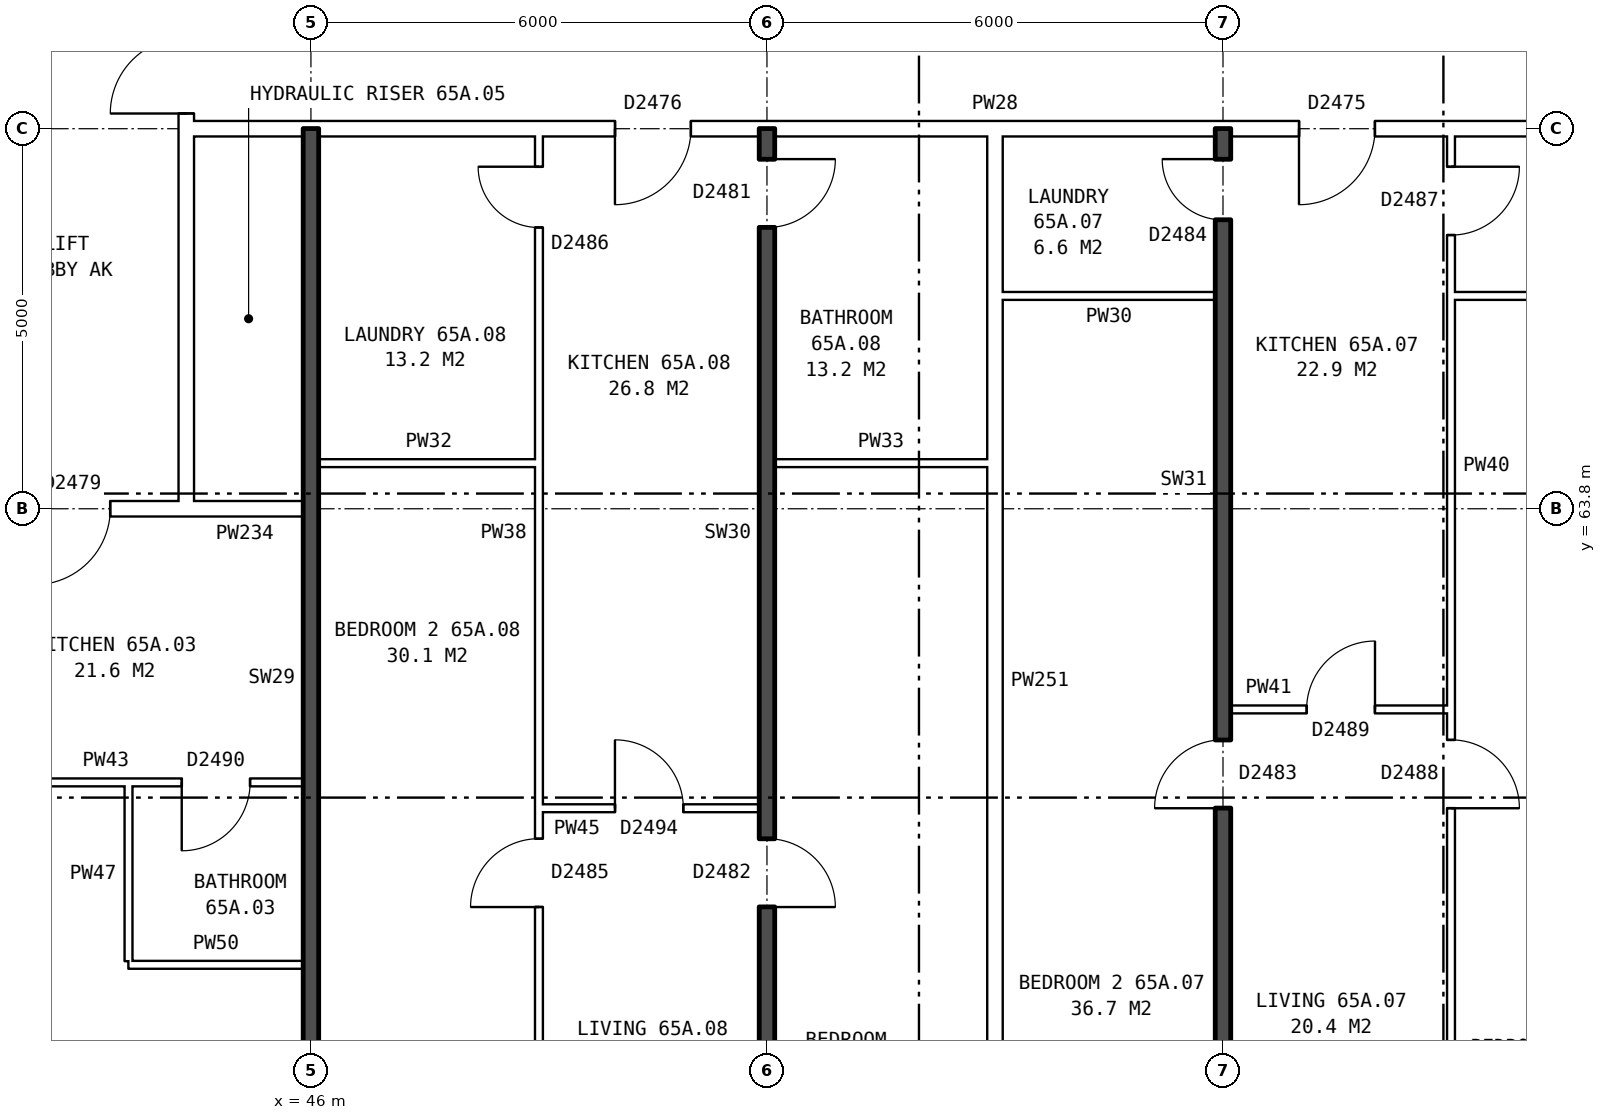
"""IFC4 building model, lengths in metres.
Left out: names, types, materials, properties, quantities, classifications, styles, units other than length and angle.
Written with IfcOpenShell. Run it as: python <this file> out.ifc"""

import sys

from ifc_helpers import new_model, si_unit, direction, frame, frame_2d, origin, place, context, subcontext, project, spatial, rectangle, extrude, element, fill, save


model = new_model("IFC4")
c1 = context("Model", 3, precision=1e-05, world=origin(), true_north=direction((0.0, 1.0)))
c2 = subcontext(c1, "Body", "Model", "MODEL_VIEW")
j1 = project(units=[si_unit("LENGTHUNIT", "METRE"), si_unit("PLANEANGLEUNIT", "RADIAN")], contexts=[c1])
p1 = place(None, origin())
s1 = spatial("IfcSite", under=j1, at=p1, CompositionType="ELEMENT")
p2 = place(p1, origin())
s2 = spatial("IfcBuilding", under=s1, at=p2, CompositionType="ELEMENT")
p3 = place(p2, frame((0.0, 0.0, 230.7)))
s3 = spatial("IfcBuildingStorey", under=s2, at=p3, CompositionType="ELEMENT", Elevation=230.7)
p4 = place(p3, frame((44.36, 63.9, 0.0), z_axis=(0.0, 0.0, 1.0), x_axis=(0.0, 1.0, 0.0)))
e1 = element("IfcWall", 1, at=p4, inside=s3, PredefinedType="PARTITIONING", context=c2, shape_type="SweptSolid", body=[
    extrude(rectangle(XDim=12.2, YDim=0.2, at=frame_2d((6.1, 0.0))), origin(), (0.0, 0.0, 1.0), 2.85),
])
p5 = place(p4, frame((5.1, 0.0, 0.0)))
e2 = element("IfcOpeningElement", 2, at=p5, cuts=e1, PredefinedType="OPENING", context=c2, shape_type="SweptSolid", body=[
    extrude(rectangle(XDim=2.0, YDim=2.1, at=frame_2d((1.0, 1.05))), frame((0.0, 0.11, 0.0), z_axis=(0.0, -1.0, 0.0), x_axis=(1.0, 0.0, 0.0)), (0.0, 0.0, 1.0), 0.22),
])
p6 = place(p3, frame((43.6, 57.8, 0.0), z_axis=(0.0, 0.0, 1.0), x_axis=(1.0, 0.0, 0.0)))
e3 = element("IfcWall", 3, at=p6, inside=s3, PredefinedType="PARTITIONING", context=c2, shape_type="SweptSolid", body=[
    extrude(rectangle(XDim=2.3, YDim=0.1, at=frame_2d((1.15, 0.0))), origin(), (0.0, 0.0, 1.0), 2.85),
])
p7 = place(p3, frame((49.0, 59.86, 0.0), z_axis=(0.0, 0.0, 1.0), x_axis=(1.0, 0.0, 0.0)))
e4 = element("IfcWall", 4, at=p7, inside=s3, PredefinedType="PARTITIONING", context=c2, shape_type="SweptSolid", body=[
    extrude(rectangle(XDim=2.9, YDim=0.1, at=frame_2d((1.45, 0.0))), origin(), (0.0, 0.0, 1.0), 2.85),
])
p8 = place(p7, frame((1.0, 0.0, 0.0)))
e5 = element("IfcOpeningElement", 5, at=p8, cuts=e4, PredefinedType="OPENING", context=c2, shape_type="SweptSolid", body=[
    extrude(rectangle(XDim=0.9, YDim=2.1, at=frame_2d((0.45, 1.05))), frame((0.0, 0.06, 0.0), z_axis=(0.0, -1.0, 0.0), x_axis=(1.0, 0.0, 0.0)), (0.0, 0.0, 1.0), 0.12),
])
p9 = place(p3, frame((40.1, 60.2, 0.0), z_axis=(0.0, 0.0, 1.0), x_axis=(1.0, 0.0, 0.0)))
e6 = element("IfcWall", 6, at=p9, inside=s3, PredefinedType="PARTITIONING", context=c2, shape_type="SweptSolid", body=[
    extrude(rectangle(XDim=5.8, YDim=0.1, at=frame_2d((2.9, 0.0))), origin(), (0.0, 0.0, 1.0), 2.85),
])
p10 = place(p9, frame((1.3, 0.0, 0.0)))
e7 = element("IfcOpeningElement", 7, at=p10, cuts=e6, PredefinedType="OPENING", context=c2, shape_type="SweptSolid", body=[
    extrude(rectangle(XDim=0.9, YDim=2.1, at=frame_2d((0.45, 1.05))), frame((0.0, 0.06, 0.0), z_axis=(0.0, -1.0, 0.0), x_axis=(1.0, 0.0, 0.0)), (0.0, 0.0, 1.0), 0.12),
])
p11 = place(p9, frame((4.2, 0.0, 0.0)))
e8 = element("IfcOpeningElement", 8, at=p11, cuts=e6, PredefinedType="OPENING", context=c2, shape_type="SweptSolid", body=[
    extrude(rectangle(XDim=0.9, YDim=2.1, at=frame_2d((0.45, 1.05))), frame((0.0, 0.06, 0.0), z_axis=(0.0, -1.0, 0.0), x_axis=(1.0, 0.0, 0.0)), (0.0, 0.0, 1.0), 0.12),
])
p12 = place(p3, frame((58.1, 61.16, 0.0), z_axis=(0.0, 0.0, 1.0), x_axis=(1.0, 0.0, 0.0)))
e9 = element("IfcWall", 9, at=p12, inside=s3, PredefinedType="PARTITIONING", context=c2, shape_type="SweptSolid", body=[
    extrude(rectangle(XDim=2.9, YDim=0.1, at=frame_2d((1.45, 0.0))), origin(), (0.0, 0.0, 1.0), 2.85),
])
p13 = place(p12, frame((1.0, 0.0, 0.0)))
e10 = element("IfcOpeningElement", 10, at=p13, cuts=e9, PredefinedType="OPENING", context=c2, shape_type="SweptSolid", body=[
    extrude(rectangle(XDim=0.9, YDim=2.1, at=frame_2d((0.45, 1.05))), frame((0.0, 0.06, 0.0), z_axis=(0.0, -1.0, 0.0), x_axis=(1.0, 0.0, 0.0)), (0.0, 0.0, 1.0), 0.12),
])
p14 = place(p3, frame((41.36, 63.8, 0.0), z_axis=(0.0, 0.0, 1.0), x_axis=(1.0, 0.0, 0.0)))
e11 = element("IfcWall", 11, at=p14, inside=s3, PredefinedType="PARTITIONING", context=c2, shape_type="SweptSolid", body=[
    extrude(rectangle(XDim=3.0, YDim=0.2, at=frame_2d((1.5, 0.0))), origin(), (0.0, 0.0, 1.0), 2.85),
])
p15 = place(p14, frame((1.0, 0.0, 0.0)))
e12 = element("IfcOpeningElement", 12, at=p15, cuts=e11, PredefinedType="OPENING", context=c2, shape_type="SweptSolid", body=[
    extrude(rectangle(XDim=1.0, YDim=2.1, at=frame_2d((0.5, 1.05))), frame((0.0, 0.11, 0.0), z_axis=(0.0, -1.0, 0.0), x_axis=(1.0, 0.0, 0.0)), (0.0, 0.0, 1.0), 0.22),
])
p16 = place(p3, frame((44.36, 63.8, 0.0), z_axis=(0.0, 0.0, 1.0), x_axis=(1.0, 0.0, 0.0)))
e13 = element("IfcWall", 13, at=p16, inside=s3, PredefinedType="PARTITIONING", context=c2, shape_type="SweptSolid", body=[
    extrude(rectangle(XDim=1.54, YDim=0.2, at=frame_2d((0.77, 0.0))), origin(), (0.0, 0.0, 1.0), 2.85),
])
p17 = place(p3, frame((46.1, 64.4, 0.0), z_axis=(0.0, 0.0, 1.0), x_axis=(1.0, 0.0, 0.0)))
e14 = element("IfcWall", 14, at=p17, inside=s3, PredefinedType="PARTITIONING", context=c2, shape_type="SweptSolid", body=[
    extrude(rectangle(XDim=2.9, YDim=0.1, at=frame_2d((1.45, 0.0))), origin(), (0.0, 0.0, 1.0), 2.85),
])
for number, where, z_axis, x_axis in (
    (15, (52.1, 64.4, 0.0), (0.0, 0.0, 1.0), (1.0, 0.0, 0.0)),
    (16, (55.1, 66.6, 0.0), (0.0, 0.0, 1.0), (1.0, 0.0, 0.0)),
):
    element("IfcWall", number, at=place(p3, frame(where, z_axis=z_axis, x_axis=x_axis)), inside=s3, PredefinedType="PARTITIONING", context=c2, shape_type="SweptSolid", body=[
        extrude(rectangle(XDim=2.8, YDim=0.1, at=frame_2d((1.4, 0.0))), origin(), (0.0, 0.0, 1.0), 2.85),
    ])
p18 = place(p3, frame((61.0, 66.6, 0.0), z_axis=(0.0, 0.0, 1.0), x_axis=(1.0, 0.0, 0.0)))
e17 = element("IfcWall", 17, at=p18, inside=s3, PredefinedType="PARTITIONING", context=c2, shape_type="SweptSolid", body=[
    extrude(rectangle(XDim=2.64, YDim=0.1, at=frame_2d((1.32, 0.0))), origin(), (0.0, 0.0, 1.0), 2.85),
])
p19 = place(p3, frame((44.36, 68.8, 0.0), z_axis=(0.0, 0.0, 1.0), x_axis=(1.0, 0.0, 0.0)))
e18 = element("IfcWall", 18, at=p19, inside=s3, PredefinedType="PARTITIONING", context=c2, shape_type="SweptSolid", body=[
    extrude(rectangle(XDim=19.28, YDim=0.2, at=frame_2d((9.64, 0.0))), origin(), (0.0, 0.0, 1.0), 2.85),
])
p20 = place(p19, frame((14.64, 0.0, 0.0)))
e19 = element("IfcOpeningElement", 19, at=p20, cuts=e18, PredefinedType="OPENING", context=c2, shape_type="SweptSolid", body=[
    extrude(rectangle(XDim=1.0, YDim=2.1, at=frame_2d((0.5, 1.05))), frame((0.0, 0.11, 0.0), z_axis=(0.0, -1.0, 0.0), x_axis=(1.0, 0.0, 0.0)), (0.0, 0.0, 1.0), 0.22),
])
p21 = place(p19, frame((5.64, 0.0, 0.0)))
e20 = element("IfcOpeningElement", 20, at=p21, cuts=e18, PredefinedType="OPENING", context=c2, shape_type="SweptSolid", body=[
    extrude(rectangle(XDim=1.0, YDim=2.1, at=frame_2d((0.5, 1.05))), frame((0.0, 0.11, 0.0), z_axis=(0.0, -1.0, 0.0), x_axis=(1.0, 0.0, 0.0)), (0.0, 0.0, 1.0), 0.22),
])
p22 = place(p3, frame((43.6, 57.85, 0.0), z_axis=(0.0, 0.0, 1.0), x_axis=(0.0, 1.0, 0.0)))
e21 = element("IfcWall", 21, at=p22, inside=s3, PredefinedType="PARTITIONING", context=c2, shape_type="SweptSolid", body=[
    extrude(rectangle(XDim=2.3, YDim=0.1, at=frame_2d((1.15, 0.0))), origin(), (0.0, 0.0, 1.0), 2.85),
])
p23 = place(p3, frame((46.0, 54.36, 0.0), z_axis=(0.0, 0.0, 1.0), x_axis=(0.0, 1.0, 0.0)))
e22 = element("IfcWall", 22, at=p23, inside=s3, PredefinedType="SOLIDWALL", context=c2, shape_type="SweptSolid", body=[
    extrude(rectangle(XDim=14.44, YDim=0.2, at=frame_2d((7.22, 0.0))), origin(), (0.0, 0.0, 1.0), 2.85),
])
p24 = place(p3, frame((49.0, 54.36, 0.0), z_axis=(0.0, 0.0, 1.0), x_axis=(0.0, 1.0, 0.0)))
e23 = element("IfcWall", 23, at=p24, inside=s3, PredefinedType="PARTITIONING", context=c2, shape_type="SweptSolid", body=[
    extrude(rectangle(XDim=14.34, YDim=0.1, at=frame_2d((7.17, 0.0))), origin(), (0.0, 0.0, 1.0), 2.85),
])
p25 = place(p24, frame((4.2, 0.0, 0.0)))
e24 = element("IfcOpeningElement", 24, at=p25, cuts=e23, PredefinedType="OPENING", context=c2, shape_type="SweptSolid", body=[
    extrude(rectangle(XDim=0.9, YDim=2.1, at=frame_2d((0.45, 1.05))), frame((0.0, 0.06, 0.0), z_axis=(0.0, -1.0, 0.0), x_axis=(1.0, 0.0, 0.0)), (0.0, 0.0, 1.0), 0.12),
])
p26 = place(p24, frame((13.14, 0.0, 0.0)))
e25 = element("IfcOpeningElement", 25, at=p26, cuts=e23, PredefinedType="OPENING", context=c2, shape_type="SweptSolid", body=[
    extrude(rectangle(XDim=0.8, YDim=2.1, at=frame_2d((0.4, 1.05))), frame((0.0, 0.06, 0.0), z_axis=(0.0, -1.0, 0.0), x_axis=(1.0, 0.0, 0.0)), (0.0, 0.0, 1.0), 0.12),
])
p27 = place(p3, frame((52.0, 54.36, 0.0), z_axis=(0.0, 0.0, 1.0), x_axis=(0.0, 1.0, 0.0)))
e26 = element("IfcWall", 26, at=p27, inside=s3, PredefinedType="SOLIDWALL", context=c2, shape_type="SweptSolid", body=[
    extrude(rectangle(XDim=14.44, YDim=0.2, at=frame_2d((7.22, 0.0))), origin(), (0.0, 0.0, 1.0), 2.85),
])
p28 = place(p27, frame((4.2, 0.0, 0.0)))
e27 = element("IfcOpeningElement", 27, at=p28, cuts=e26, PredefinedType="OPENING", context=c2, shape_type="SweptSolid", body=[
    extrude(rectangle(XDim=0.9, YDim=2.1, at=frame_2d((0.45, 1.05))), frame((0.0, 0.11, 0.0), z_axis=(0.0, -1.0, 0.0), x_axis=(1.0, 0.0, 0.0)), (0.0, 0.0, 1.0), 0.22),
])
p29 = place(p27, frame((13.14, 0.0, 0.0)))
e28 = element("IfcOpeningElement", 28, at=p29, cuts=e26, PredefinedType="OPENING", context=c2, shape_type="SweptSolid", body=[
    extrude(rectangle(XDim=0.9, YDim=2.1, at=frame_2d((0.45, 1.05))), frame((0.0, 0.11, 0.0), z_axis=(0.0, -1.0, 0.0), x_axis=(1.0, 0.0, 0.0)), (0.0, 0.0, 1.0), 0.22),
])
p30 = place(p3, frame((55.0, 54.36, 0.0), z_axis=(0.0, 0.0, 1.0), x_axis=(0.0, 1.0, 0.0)))
e29 = element("IfcWall", 29, at=p30, inside=s3, PredefinedType="PARTITIONING", context=c2, shape_type="SweptSolid", body=[
    extrude(rectangle(XDim=14.34, YDim=0.2, at=frame_2d((7.17, 0.0))), origin(), (0.0, 0.0, 1.0), 2.85),
])
p31 = place(p3, frame((58.0, 54.36, 0.0), z_axis=(0.0, 0.0, 1.0), x_axis=(0.0, 1.0, 0.0)))
e30 = element("IfcWall", 30, at=p31, inside=s3, PredefinedType="SOLIDWALL", context=c2, shape_type="SweptSolid", body=[
    extrude(rectangle(XDim=14.44, YDim=0.2, at=frame_2d((7.22, 0.0))), origin(), (0.0, 0.0, 1.0), 2.85),
])
p32 = place(p31, frame((5.5, 0.0, 0.0)))
e31 = element("IfcOpeningElement", 31, at=p32, cuts=e30, PredefinedType="OPENING", context=c2, shape_type="SweptSolid", body=[
    extrude(rectangle(XDim=0.9, YDim=2.1, at=frame_2d((0.45, 1.05))), frame((0.0, 0.11, 0.0), z_axis=(0.0, -1.0, 0.0), x_axis=(1.0, 0.0, 0.0)), (0.0, 0.0, 1.0), 0.22),
])
p33 = place(p31, frame((13.24, 0.0, 0.0)))
e32 = element("IfcOpeningElement", 32, at=p33, cuts=e30, PredefinedType="OPENING", context=c2, shape_type="SweptSolid", body=[
    extrude(rectangle(XDim=0.8, YDim=2.1, at=frame_2d((0.4, 1.05))), frame((0.0, 0.11, 0.0), z_axis=(0.0, -1.0, 0.0), x_axis=(1.0, 0.0, 0.0)), (0.0, 0.0, 1.0), 0.22),
])
p34 = place(p3, frame((61.0, 54.36, 0.0), z_axis=(0.0, 0.0, 1.0), x_axis=(0.0, 1.0, 0.0)))
e33 = element("IfcWall", 33, at=p34, inside=s3, PredefinedType="PARTITIONING", context=c2, shape_type="SweptSolid", body=[
    extrude(rectangle(XDim=14.34, YDim=0.1, at=frame_2d((7.17, 0.0))), origin(), (0.0, 0.0, 1.0), 2.85),
])
p35 = place(p34, frame((5.5, 0.0, 0.0)))
e34 = element("IfcOpeningElement", 34, at=p35, cuts=e33, PredefinedType="OPENING", context=c2, shape_type="SweptSolid", body=[
    extrude(rectangle(XDim=0.9, YDim=2.1, at=frame_2d((0.45, 1.05))), frame((0.0, 0.06, 0.0), z_axis=(0.0, -1.0, 0.0), x_axis=(1.0, 0.0, 0.0)), (0.0, 0.0, 1.0), 0.12),
])
p36 = place(p34, frame((13.04, 0.0, 0.0)))
e35 = element("IfcOpeningElement", 35, at=p36, cuts=e33, PredefinedType="OPENING", context=c2, shape_type="SweptSolid", body=[
    extrude(rectangle(XDim=0.9, YDim=2.1, at=frame_2d((0.45, 1.05))), frame((0.0, 0.06, 0.0), z_axis=(0.0, -1.0, 0.0), x_axis=(1.0, 0.0, 0.0)), (0.0, 0.0, 1.0), 0.12),
])
p37 = place(p5, origin())
e36 = element("IfcDoor", 36, at=p37, inside=s3, OperationType="DOUBLE_DOOR_SINGLE_SWING", PredefinedType="DOOR", context=c2, shape_type="SweptSolid", body=[
    extrude(rectangle(XDim=2.0, YDim=2.1, at=frame_2d((1.0, 1.05))), frame((0.0, 0.025, 0.0), z_axis=(0.0, -1.0, 0.0), x_axis=(1.0, 0.0, 0.0)), (0.0, 0.0, 1.0), 0.05),
])
fill(e2, e36)
p38 = place(p15, frame((1.0, 0.0, 0.0), z_axis=(0.0, 0.0, 1.0), x_axis=(-1.0, 0.0, 0.0)))
e37 = element("IfcDoor", 37, at=p38, inside=s3, OperationType="SINGLE_SWING_RIGHT", PredefinedType="DOOR", context=c2, shape_type="SweptSolid", body=[
    extrude(rectangle(XDim=1.0, YDim=2.1, at=frame_2d((0.5, 1.05))), frame((0.0, 0.025, 0.0), z_axis=(0.0, -1.0, 0.0), x_axis=(1.0, 0.0, 0.0)), (0.0, 0.0, 1.0), 0.05),
])
fill(e12, e37)
p39 = place(p11, frame((0.9, 0.0, 0.0), z_axis=(0.0, 0.0, 1.0), x_axis=(-1.0, 0.0, 0.0)))
e38 = element("IfcDoor", 38, at=p39, inside=s3, OperationType="SINGLE_SWING_RIGHT", PredefinedType="DOOR", context=c2, shape_type="SweptSolid", body=[
    extrude(rectangle(XDim=0.9, YDim=2.1, at=frame_2d((0.45, 1.05))), frame((0.0, 0.025, 0.0), z_axis=(0.0, -1.0, 0.0), x_axis=(1.0, 0.0, 0.0)), (0.0, 0.0, 1.0), 0.05),
])
fill(e8, e38)
p40 = place(p35, frame((0.9, 0.0, 0.0), z_axis=(0.0, 0.0, 1.0), x_axis=(-1.0, 0.0, 0.0)))
e39 = element("IfcDoor", 39, at=p40, inside=s3, OperationType="SINGLE_SWING_RIGHT", PredefinedType="DOOR", context=c2, shape_type="SweptSolid", body=[
    extrude(rectangle(XDim=0.9, YDim=2.1, at=frame_2d((0.45, 1.05))), frame((0.0, 0.025, 0.0), z_axis=(0.0, -1.0, 0.0), x_axis=(1.0, 0.0, 0.0)), (0.0, 0.0, 1.0), 0.05),
])
fill(e34, e39)
p41 = place(p32, origin())
e40 = element("IfcDoor", 40, at=p41, inside=s3, OperationType="SINGLE_SWING_LEFT", PredefinedType="DOOR", context=c2, shape_type="SweptSolid", body=[
    extrude(rectangle(XDim=0.9, YDim=2.1, at=frame_2d((0.45, 1.05))), frame((0.0, 0.025, 0.0), z_axis=(0.0, -1.0, 0.0), x_axis=(1.0, 0.0, 0.0)), (0.0, 0.0, 1.0), 0.05),
])
fill(e31, e40)
p42 = place(p20, frame((1.0, 0.0, 0.0), z_axis=(0.0, 0.0, 1.0), x_axis=(-1.0, 0.0, 0.0)))
e41 = element("IfcDoor", 41, at=p42, inside=s3, OperationType="SINGLE_SWING_RIGHT", PredefinedType="DOOR", context=c2, shape_type="SweptSolid", body=[
    extrude(rectangle(XDim=1.0, YDim=2.1, at=frame_2d((0.5, 1.05))), frame((0.0, 0.025, 0.0), z_axis=(0.0, -1.0, 0.0), x_axis=(1.0, 0.0, 0.0)), (0.0, 0.0, 1.0), 0.05),
])
fill(e19, e41)
p43 = place(p13, origin())
e42 = element("IfcDoor", 42, at=p43, inside=s3, OperationType="SINGLE_SWING_RIGHT", PredefinedType="DOOR", context=c2, shape_type="SweptSolid", body=[
    extrude(rectangle(XDim=0.9, YDim=2.1, at=frame_2d((0.45, 1.05))), frame((0.0, 0.025, 0.0), z_axis=(0.0, -1.0, 0.0), x_axis=(1.0, 0.0, 0.0)), (0.0, 0.0, 1.0), 0.05),
])
fill(e10, e42)
p44 = place(p36, frame((0.9, 0.0, 0.0), z_axis=(0.0, 0.0, 1.0), x_axis=(-1.0, 0.0, 0.0)))
e43 = element("IfcDoor", 43, at=p44, inside=s3, OperationType="SINGLE_SWING_LEFT", PredefinedType="DOOR", context=c2, shape_type="SweptSolid", body=[
    extrude(rectangle(XDim=0.9, YDim=2.1, at=frame_2d((0.45, 1.05))), frame((0.0, 0.025, 0.0), z_axis=(0.0, -1.0, 0.0), x_axis=(1.0, 0.0, 0.0)), (0.0, 0.0, 1.0), 0.05),
])
fill(e35, e43)
p45 = place(p33, origin())
e44 = element("IfcDoor", 44, at=p45, inside=s3, OperationType="SINGLE_SWING_RIGHT", PredefinedType="DOOR", context=c2, shape_type="SweptSolid", body=[
    extrude(rectangle(XDim=0.8, YDim=2.1, at=frame_2d((0.4, 1.05))), frame((0.0, 0.025, 0.0), z_axis=(0.0, -1.0, 0.0), x_axis=(1.0, 0.0, 0.0)), (0.0, 0.0, 1.0), 0.05),
])
fill(e32, e44)
p46 = place(p28, frame((0.9, 0.0, 0.0), z_axis=(0.0, 0.0, 1.0), x_axis=(-1.0, 0.0, 0.0)))
e45 = element("IfcDoor", 45, at=p46, inside=s3, OperationType="SINGLE_SWING_RIGHT", PredefinedType="DOOR", context=c2, shape_type="SweptSolid", body=[
    extrude(rectangle(XDim=0.9, YDim=2.1, at=frame_2d((0.45, 1.05))), frame((0.0, 0.025, 0.0), z_axis=(0.0, -1.0, 0.0), x_axis=(1.0, 0.0, 0.0)), (0.0, 0.0, 1.0), 0.05),
])
fill(e27, e45)
p47 = place(p25, origin())
e46 = element("IfcDoor", 46, at=p47, inside=s3, OperationType="SINGLE_SWING_LEFT", PredefinedType="DOOR", context=c2, shape_type="SweptSolid", body=[
    extrude(rectangle(XDim=0.9, YDim=2.1, at=frame_2d((0.45, 1.05))), frame((0.0, 0.025, 0.0), z_axis=(0.0, -1.0, 0.0), x_axis=(1.0, 0.0, 0.0)), (0.0, 0.0, 1.0), 0.05),
])
fill(e24, e46)
p48 = place(p21, frame((1.0, 0.0, 0.0), z_axis=(0.0, 0.0, 1.0), x_axis=(-1.0, 0.0, 0.0)))
e47 = element("IfcDoor", 47, at=p48, inside=s3, OperationType="SINGLE_SWING_RIGHT", PredefinedType="DOOR", context=c2, shape_type="SweptSolid", body=[
    extrude(rectangle(XDim=1.0, YDim=2.1, at=frame_2d((0.5, 1.05))), frame((0.0, 0.025, 0.0), z_axis=(0.0, -1.0, 0.0), x_axis=(1.0, 0.0, 0.0)), (0.0, 0.0, 1.0), 0.05),
])
fill(e20, e47)
p49 = place(p8, origin())
e48 = element("IfcDoor", 48, at=p49, inside=s3, OperationType="SINGLE_SWING_LEFT", PredefinedType="DOOR", context=c2, shape_type="SweptSolid", body=[
    extrude(rectangle(XDim=0.9, YDim=2.1, at=frame_2d((0.45, 1.05))), frame((0.0, 0.025, 0.0), z_axis=(0.0, -1.0, 0.0), x_axis=(1.0, 0.0, 0.0)), (0.0, 0.0, 1.0), 0.05),
])
fill(e5, e48)
p50 = place(p29, frame((0.9, 0.0, 0.0), z_axis=(0.0, 0.0, 1.0), x_axis=(-1.0, 0.0, 0.0)))
e49 = element("IfcDoor", 49, at=p50, inside=s3, OperationType="SINGLE_SWING_LEFT", PredefinedType="DOOR", context=c2, shape_type="SweptSolid", body=[
    extrude(rectangle(XDim=0.9, YDim=2.1, at=frame_2d((0.45, 1.05))), frame((0.0, 0.025, 0.0), z_axis=(0.0, -1.0, 0.0), x_axis=(1.0, 0.0, 0.0)), (0.0, 0.0, 1.0), 0.05),
])
fill(e28, e49)
p51 = place(p26, origin())
e50 = element("IfcDoor", 50, at=p51, inside=s3, OperationType="SINGLE_SWING_RIGHT", PredefinedType="DOOR", context=c2, shape_type="SweptSolid", body=[
    extrude(rectangle(XDim=0.8, YDim=2.1, at=frame_2d((0.4, 1.05))), frame((0.0, 0.025, 0.0), z_axis=(0.0, -1.0, 0.0), x_axis=(1.0, 0.0, 0.0)), (0.0, 0.0, 1.0), 0.05),
])
fill(e25, e50)
save(model, sys.argv[1])
